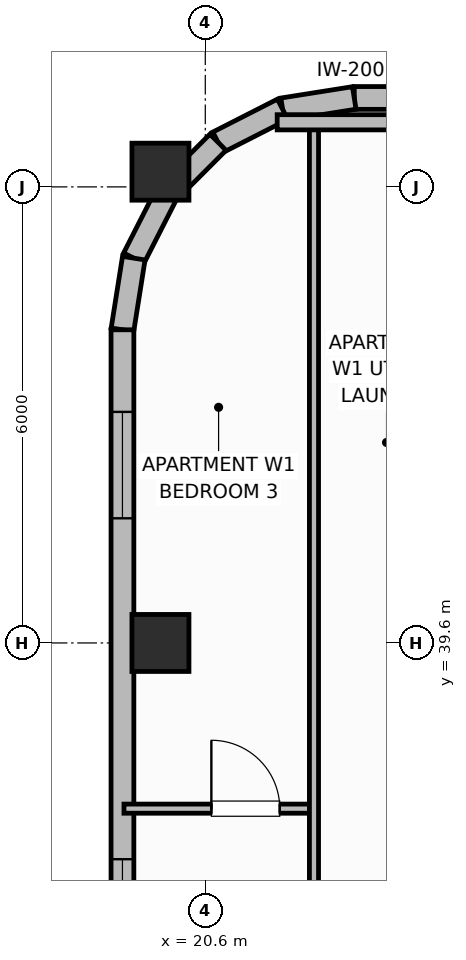
"""IFC4 building model, lengths in metres.
Left out: names, types, materials, properties, quantities, classifications, styles, units other than length and angle.
Written with IfcOpenShell. Run it as: python <this file> out.ifc"""

import sys

from ifc_helpers import new_model, si_unit, direction, frame, frame_2d, origin, origin_2d, place, context, subcontext, project, spatial, rectangle, extrude, element, fill, save


model = new_model("IFC4")
c1 = context("Model", 3, precision=1e-05, world=origin(), true_north=direction((0.0, 1.0)))
c2 = subcontext(c1, "Body", "Model", "MODEL_VIEW")
j1 = project(units=[si_unit("LENGTHUNIT", "METRE"), si_unit("PLANEANGLEUNIT", "RADIAN")], contexts=[c1])
p1 = place(None, origin())
s1 = spatial("IfcSite", under=j1, at=p1, CompositionType="ELEMENT")
p2 = place(p1, origin())
s2 = spatial("IfcBuilding", under=s1, at=p2, CompositionType="ELEMENT")
p3 = place(p2, frame((0.0, 0.0, 260.2)))
s3 = spatial("IfcBuildingStorey", under=s2, at=p3, CompositionType="ELEMENT", Elevation=260.2)
for number, where, z_axis, x_axis in (
    (1, (20.01, 39.6, 0.0), (0.0, 0.0, 1.0), (1.0, 0.0, 0.0)),
    (2, (20.01, 45.8, 0.0), (0.0, 0.0, 1.0), (1.0, 0.0, 0.0)),
):
    element("IfcColumn", number, at=place(p3, frame(where, z_axis=z_axis, x_axis=x_axis)), inside=s3, PredefinedType="COLUMN", context=c2, shape_type="SweptSolid", body=[
        extrude(rectangle(XDim=0.75, YDim=0.75, at=origin_2d()), origin(), (0.0, 0.0, 1.0), 3.7),
    ])
p4 = place(p3, frame((55.84, 46.77, 0.0), z_axis=(0.0, 0.0, 1.0), x_axis=(-1.0, 0.0, 0.0)))
e3 = element("IfcWall", 3, at=p4, inside=s3, PredefinedType="SOLIDWALL", context=c2, shape_type="SweptSolid", body=[
    extrude(rectangle(XDim=33.28, YDim=0.3, at=frame_2d((16.64, 0.0))), origin(), (0.0, 0.0, 1.0), 2.73),
])
p5 = place(p4, frame((4.461, 0.0, 0.95)))
e4 = element("IfcOpeningElement", 4, at=p5, cuts=e3, PredefinedType="OPENING", context=c2, shape_type="SweptSolid", body=[
    extrude(rectangle(XDim=1.1, YDim=1.65, at=frame_2d((0.55, 0.825))), frame((0.0, 0.16, 0.0), z_axis=(0.0, -1.0, 0.0), x_axis=(1.0, 0.0, 0.0)), (0.0, 0.0, 1.0), 0.32),
])
p6 = place(p4, frame((7.368, 0.0, 0.95)))
e5 = element("IfcOpeningElement", 5, at=p6, cuts=e3, PredefinedType="OPENING", context=c2, shape_type="SweptSolid", body=[
    extrude(rectangle(XDim=1.1, YDim=1.65, at=frame_2d((0.55, 0.825))), frame((0.0, 0.16, 0.0), z_axis=(0.0, -1.0, 0.0), x_axis=(1.0, 0.0, 0.0)), (0.0, 0.0, 1.0), 0.32),
])
p7 = place(p4, frame((10.275, 0.0, 0.95)))
e6 = element("IfcOpeningElement", 6, at=p7, cuts=e3, PredefinedType="OPENING", context=c2, shape_type="SweptSolid", body=[
    extrude(rectangle(XDim=1.1, YDim=1.65, at=frame_2d((0.55, 0.825))), frame((0.0, 0.16, 0.0), z_axis=(0.0, -1.0, 0.0), x_axis=(1.0, 0.0, 0.0)), (0.0, 0.0, 1.0), 0.32),
])
p8 = place(p4, frame((13.883, 0.0, 0.95)))
e7 = element("IfcOpeningElement", 7, at=p8, cuts=e3, PredefinedType="OPENING", context=c2, shape_type="SweptSolid", body=[
    extrude(rectangle(XDim=1.1, YDim=1.65, at=frame_2d((0.55, 0.825))), frame((0.0, 0.16, 0.0), z_axis=(0.0, -1.0, 0.0), x_axis=(1.0, 0.0, 0.0)), (0.0, 0.0, 1.0), 0.32),
])
p9 = place(p4, frame((16.09, 0.0, 0.95)))
e8 = element("IfcOpeningElement", 8, at=p9, cuts=e3, PredefinedType="OPENING", context=c2, shape_type="SweptSolid", body=[
    extrude(rectangle(XDim=1.1, YDim=1.65, at=frame_2d((0.55, 0.825))), frame((0.0, 0.16, 0.0), z_axis=(0.0, -1.0, 0.0), x_axis=(1.0, 0.0, 0.0)), (0.0, 0.0, 1.0), 0.32),
])
p10 = place(p4, frame((18.297, 0.0, 0.95)))
e9 = element("IfcOpeningElement", 9, at=p10, cuts=e3, PredefinedType="OPENING", context=c2, shape_type="SweptSolid", body=[
    extrude(rectangle(XDim=1.1, YDim=1.65, at=frame_2d((0.55, 0.825))), frame((0.0, 0.16, 0.0), z_axis=(0.0, -1.0, 0.0), x_axis=(1.0, 0.0, 0.0)), (0.0, 0.0, 1.0), 0.32),
])
p11 = place(p4, frame((21.905, 0.0, 0.95)))
e10 = element("IfcOpeningElement", 10, at=p11, cuts=e3, PredefinedType="OPENING", context=c2, shape_type="SweptSolid", body=[
    extrude(rectangle(XDim=1.1, YDim=1.65, at=frame_2d((0.55, 0.825))), frame((0.0, 0.16, 0.0), z_axis=(0.0, -1.0, 0.0), x_axis=(1.0, 0.0, 0.0)), (0.0, 0.0, 1.0), 0.32),
])
p12 = place(p4, frame((24.812, 0.0, 0.95)))
e11 = element("IfcOpeningElement", 11, at=p12, cuts=e3, PredefinedType="OPENING", context=c2, shape_type="SweptSolid", body=[
    extrude(rectangle(XDim=1.1, YDim=1.65, at=frame_2d((0.55, 0.825))), frame((0.0, 0.16, 0.0), z_axis=(0.0, -1.0, 0.0), x_axis=(1.0, 0.0, 0.0)), (0.0, 0.0, 1.0), 0.32),
])
p13 = place(p4, frame((27.719, 0.0, 0.95)))
e12 = element("IfcOpeningElement", 12, at=p13, cuts=e3, PredefinedType="OPENING", context=c2, shape_type="SweptSolid", body=[
    extrude(rectangle(XDim=1.1, YDim=1.65, at=frame_2d((0.55, 0.825))), frame((0.0, 0.16, 0.0), z_axis=(0.0, -1.0, 0.0), x_axis=(1.0, 0.0, 0.0)), (0.0, 0.0, 1.0), 0.32),
])
p14 = place(p3, frame((22.56, 46.77, 0.0), z_axis=(0.0, 0.0, 1.0), x_axis=(-0.987669453596, -0.156553666304, 0.0)))
e13 = element("IfcWall", 13, at=p14, inside=s3, PredefinedType="SOLIDWALL", context=c2, shape_type="SweptSolid", body=[
    extrude(rectangle(XDim=0.954, YDim=0.3, at=frame_2d((0.477, 0.0))), origin(), (0.0, 0.0, 1.0), 2.73),
])
p15 = place(p3, frame((21.617, 46.621, 0.0), z_axis=(0.0, 0.0, 1.0), x_axis=(-0.891023873617, -0.45395644796, 0.0)))
e14 = element("IfcWall", 14, at=p15, inside=s3, PredefinedType="SOLIDWALL", context=c2, shape_type="SweptSolid", body=[
    extrude(rectangle(XDim=0.954, YDim=0.3, at=frame_2d((0.477, 0.0))), origin(), (0.0, 0.0, 1.0), 2.73),
])
p16 = place(p3, frame((20.767, 46.188, 0.0), z_axis=(0.0, 0.0, 1.0), x_axis=(-0.707106781187, -0.707106781187, 0.0)))
e15 = element("IfcWall", 15, at=p16, inside=s3, PredefinedType="SOLIDWALL", context=c2, shape_type="SweptSolid", body=[
    extrude(rectangle(XDim=0.954, YDim=0.3, at=frame_2d((0.477, 0.0))), origin(), (0.0, 0.0, 1.0), 2.73),
])
p17 = place(p3, frame((20.093, 45.513, 0.0), z_axis=(0.0, 0.0, 1.0), x_axis=(-0.454159573051, -0.890920356825, 0.0)))
e16 = element("IfcWall", 16, at=p17, inside=s3, PredefinedType="SOLIDWALL", context=c2, shape_type="SweptSolid", body=[
    extrude(rectangle(XDim=0.954, YDim=0.3, at=frame_2d((0.477, 0.0))), origin(), (0.0, 0.0, 1.0), 2.73),
])
p18 = place(p3, frame((19.659, 44.663, 0.0), z_axis=(0.0, 0.0, 1.0), x_axis=(-0.156304114255, -0.987708977314, 0.0)))
e17 = element("IfcWall", 17, at=p18, inside=s3, PredefinedType="SOLIDWALL", context=c2, shape_type="SweptSolid", body=[
    extrude(rectangle(XDim=0.954, YDim=0.3, at=frame_2d((0.477, 0.0))), origin(), (0.0, 0.0, 1.0), 2.73),
])
p19 = place(p3, frame((19.51, 43.72, 0.0), z_axis=(0.0, 0.0, 1.0), x_axis=(0.0, -1.0, 0.0)))
e18 = element("IfcWall", 18, at=p19, inside=s3, PredefinedType="SOLIDWALL", context=c2, shape_type="SweptSolid", body=[
    extrude(rectangle(XDim=11.12, YDim=0.3, at=frame_2d((5.56, 0.0))), origin(), (0.0, 0.0, 1.0), 2.73),
])
p20 = place(p19, frame((1.08, 0.0, 0.72)))
e19 = element("IfcOpeningElement", 19, at=p20, cuts=e18, PredefinedType="OPENING", context=c2, shape_type="SweptSolid", body=[
    extrude(rectangle(XDim=1.4, YDim=1.85, at=frame_2d((0.7, 0.925))), frame((0.0, 0.16, 0.0), z_axis=(0.0, -1.0, 0.0), x_axis=(1.0, 0.0, 0.0)), (0.0, 0.0, 1.0), 0.32),
])
p21 = place(p19, frame((6.965, 0.0, 0.71)))
e20 = element("IfcOpeningElement", 20, at=p21, cuts=e18, PredefinedType="OPENING", context=c2, shape_type="SweptSolid", body=[
    extrude(rectangle(XDim=2.1, YDim=1.9, at=frame_2d((1.05, 0.95))), frame((0.0, 0.16, 0.0), z_axis=(0.0, -1.0, 0.0), x_axis=(1.0, 0.0, 0.0)), (0.0, 0.0, 1.0), 0.32),
])
p22 = place(p3, frame((19.53, 37.42, 0.0), z_axis=(0.0, 0.0, 1.0), x_axis=(1.0, 0.0, 0.0)))
e21 = element("IfcWall", 21, at=p22, inside=s3, PredefinedType="PARTITIONING", context=c2, shape_type="SweptSolid", body=[
    extrude(rectangle(XDim=2.5, YDim=0.12, at=frame_2d((1.25, 0.0))), origin(), (0.0, 0.0, 1.0), 2.56),
])
p23 = place(p22, frame((1.15, 0.0, 0.0)))
e22 = element("IfcOpeningElement", 22, at=p23, cuts=e21, PredefinedType="OPENING", context=c2, shape_type="SweptSolid", body=[
    extrude(rectangle(XDim=0.9, YDim=2.1, at=frame_2d((0.45, 1.05))), frame((0.0, 0.07, 0.0), z_axis=(0.0, -1.0, 0.0), x_axis=(1.0, 0.0, 0.0)), (0.0, 0.0, 1.0), 0.14),
])
p24 = place(p3, frame((22.03, 9.99, 0.0), z_axis=(0.0, 0.0, 1.0), x_axis=(0.0, 1.0, 0.0)))
e23 = element("IfcWall", 23, at=p24, inside=s3, PredefinedType="PARTITIONING", context=c2, shape_type="SweptSolid", body=[
    extrude(rectangle(XDim=36.42, YDim=0.12, at=frame_2d((18.21, 0.0))), origin(), (0.0, 0.0, 1.0), 2.56),
])
p25 = place(p24, frame((0.41, 0.0, 0.0)))
e24 = element("IfcOpeningElement", 24, at=p25, cuts=e23, PredefinedType="OPENING", context=c2, shape_type="SweptSolid", body=[
    extrude(rectangle(XDim=0.9, YDim=2.1, at=frame_2d((0.45, 1.05))), frame((0.0, 0.07, 0.0), z_axis=(0.0, -1.0, 0.0), x_axis=(1.0, 0.0, 0.0)), (0.0, 0.0, 1.0), 0.14),
])
p26 = place(p24, frame((15.56, 0.0, 0.0)))
e25 = element("IfcOpeningElement", 25, at=p26, cuts=e23, PredefinedType="OPENING", context=c2, shape_type="SweptSolid", body=[
    extrude(rectangle(XDim=0.82, YDim=2.08, at=frame_2d((0.41, 1.04))), frame((0.0, 0.07, 0.0), z_axis=(0.0, -1.0, 0.0), x_axis=(1.0, 0.0, 0.0)), (0.0, 0.0, 1.0), 0.14),
])
p27 = place(p3, frame((21.546, 46.45, 0.0), z_axis=(0.0, 0.0, 1.0), x_axis=(1.0, 0.0, 0.0)))
e26 = element("IfcWall", 26, at=p27, inside=s3, PredefinedType="PARTITIONING", context=c2, shape_type="SweptSolid", body=[
    extrude(rectangle(XDim=3.754, YDim=0.2, at=frame_2d((1.877, 0.0))), origin(), (0.0, 0.0, 1.0), 2.56),
])
p28 = place(p20, origin())
e27 = element("IfcWindow", 27, at=p28, inside=s3, PartitioningType="SINGLE_PANEL", PredefinedType="WINDOW", context=c2, shape_type="SweptSolid", body=[
    extrude(rectangle(XDim=1.4, YDim=1.85, at=frame_2d((0.7, 0.925))), frame((0.0, 0.03, 0.0), z_axis=(0.0, -1.0, 0.0), x_axis=(1.0, 0.0, 0.0)), (0.0, 0.0, 1.0), 0.06),
])
fill(e19, e27)
p29 = place(p21, origin())
e28 = element("IfcWindow", 28, at=p29, inside=s3, PartitioningType="SINGLE_PANEL", PredefinedType="WINDOW", context=c2, shape_type="SweptSolid", body=[
    extrude(rectangle(XDim=2.1, YDim=1.9, at=frame_2d((1.05, 0.95))), frame((0.0, 0.03, 0.0), z_axis=(0.0, -1.0, 0.0), x_axis=(1.0, 0.0, 0.0)), (0.0, 0.0, 1.0), 0.06),
])
fill(e20, e28)
p30 = place(p23, origin())
e29 = element("IfcDoor", 29, at=p30, inside=s3, OperationType="SINGLE_SWING_LEFT", PredefinedType="DOOR", context=c2, shape_type="SweptSolid", body=[
    extrude(rectangle(XDim=0.9, YDim=2.1, at=frame_2d((0.45, 1.05))), frame((0.0, 0.025, 0.0), z_axis=(0.0, -1.0, 0.0), x_axis=(1.0, 0.0, 0.0)), (0.0, 0.0, 1.0), 0.05),
])
fill(e22, e29)
save(model, sys.argv[1])
